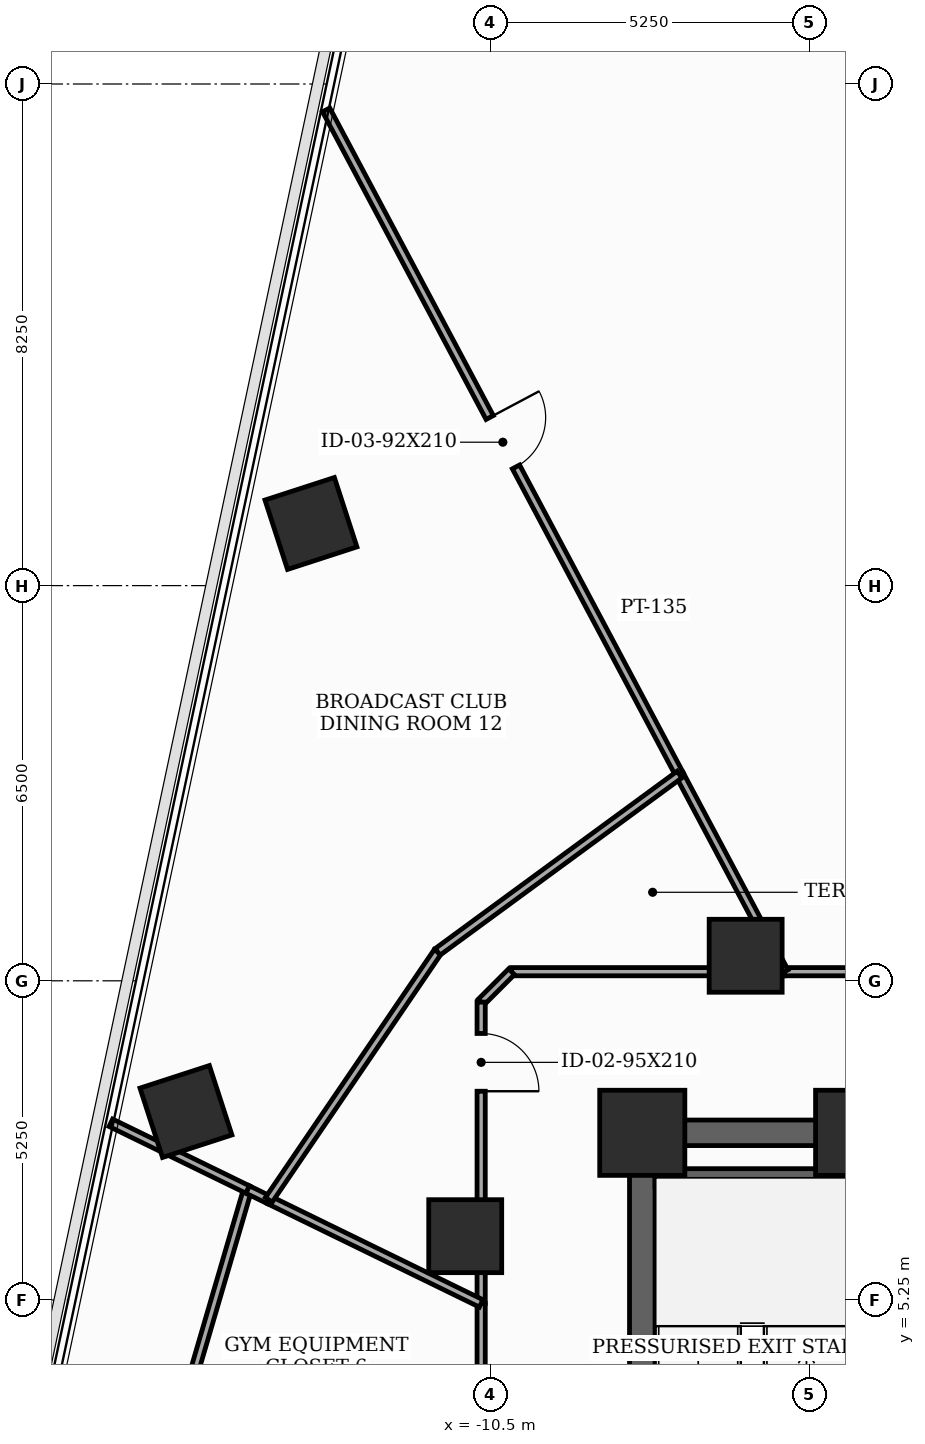
"""IFC4 building model, lengths in metres.
Left out: names, types, materials, properties, quantities, classifications, styles, units other than length and angle.
Written with IfcOpenShell. Run it as: python <this file> out.ifc"""

import sys

from ifc_helpers import new_model, si_unit, direction, frame, frame_2d, origin, origin_2d, place, context, subcontext, project, spatial, rectangle, extrude, element, fill, save


model = new_model("IFC4")
c1 = context("Model", 3, precision=1e-05, world=origin(), true_north=direction((0.0, 1.0)))
c2 = subcontext(c1, "Body", "Model", "MODEL_VIEW")
j1 = project(units=[si_unit("LENGTHUNIT", "METRE"), si_unit("PLANEANGLEUNIT", "RADIAN")], contexts=[c1])
p1 = place(None, origin())
s1 = spatial("IfcSite", under=j1, at=p1, CompositionType="ELEMENT")
p2 = place(p1, origin())
s2 = spatial("IfcBuilding", under=s1, at=p2, CompositionType="ELEMENT")
p3 = place(p2, frame((0.0, 0.0, 108.8)))
s3 = spatial("IfcBuildingStorey", under=s2, at=p3, CompositionType="ELEMENT", Elevation=108.8)
for number, where, z_axis, x_axis in (
    (1, (-4.45, 8.0, 0.0), (0.0, 0.0, 1.0), (1.0, 0.0, 0.0)),
    (2, (-8.0, 8.0, 0.0), (0.0, 0.0, 1.0), (1.0, 0.0, 0.0)),
):
    element("IfcColumn", number, at=place(p3, frame(where, z_axis=z_axis, x_axis=x_axis)), inside=s3, PredefinedType="COLUMN", context=c2, shape_type="SweptSolid", body=[
        extrude(rectangle(XDim=1.4, YDim=1.4, at=origin_2d()), origin(), (0.0, 0.0, 1.0), 3.7),
    ])
for number, where, z_axis, x_axis in (
    (3, (-6.3, 10.912, 0.0), (0.0, 0.0, 1.0), (1.0, 0.0, 0.0)),
    (4, (-10.912, 6.3, 0.0), (0.0, 0.0, 1.0), (1.0, 0.0, 0.0)),
    (5, (-13.449, 18.022, 0.0), (0.0, 0.0, 1.0), (0.951, 0.309, 0.0)),
    (6, (-15.505, 8.35, 0.0), (0.0, 0.0, 1.0), (0.951, 0.309, 0.0)),
):
    element("IfcColumn", number, at=place(p3, frame(where, z_axis=z_axis, x_axis=x_axis)), inside=s3, PredefinedType="COLUMN", context=c2, shape_type="SweptSolid", body=[
        extrude(rectangle(XDim=1.2, YDim=1.2, at=origin_2d()), origin(), (0.0, 0.0, 1.0), 3.7),
    ])
p4 = place(p3, frame((-8.0, -8.0, 0.0), z_axis=(0.0, 0.0, 1.0), x_axis=(0.0, 1.0, 0.0)))
e7 = element("IfcWall", 7, at=p4, inside=s3, PredefinedType="SHEAR", context=c2, shape_type="SweptSolid", body=[
    extrude(rectangle(XDim=16.0, YDim=0.42, at=frame_2d((8.0, 0.0))), origin(), (0.0, 0.0, 1.0), 3.5),
])
p5 = place(p4, frame((0.922, 0.0, 0.0)))
e8 = element("IfcOpeningElement", 8, at=p5, cuts=e7, PredefinedType="OPENING", context=c2, shape_type="SweptSolid", body=[
    extrude(rectangle(XDim=0.85, YDim=2.02, at=frame_2d((0.425, 1.01))), frame((0.0, 0.22, 0.0), z_axis=(0.0, -1.0, 0.0), x_axis=(1.0, 0.0, 0.0)), (0.0, 0.0, 1.0), 0.44),
])
p6 = place(p4, frame((5.35, 0.0, 0.0)))
e9 = element("IfcOpeningElement", 9, at=p6, cuts=e7, PredefinedType="OPENING", context=c2, shape_type="SweptSolid", body=[
    extrude(rectangle(XDim=1.05, YDim=2.15, at=frame_2d((0.525, 1.075))), frame((0.0, 0.22, 0.0), z_axis=(0.0, -1.0, 0.0), x_axis=(1.0, 0.0, 0.0)), (0.0, 0.0, 1.0), 0.44),
])
p7 = place(p3, frame((-8.0, 8.0, 0.0), z_axis=(0.0, 0.0, 1.0), x_axis=(1.0, 0.0, 0.0)))
e10 = element("IfcWall", 10, at=p7, inside=s3, PredefinedType="SHEAR", context=c2, shape_type="SweptSolid", body=[
    extrude(rectangle(XDim=16.0, YDim=0.42, at=frame_2d((8.0, 0.0))), origin(), (0.0, 0.0, 1.0), 3.5),
])
p8 = place(p7, frame((7.1, 0.0, 0.0)))
e11 = element("IfcOpeningElement", 11, at=p8, cuts=e10, PredefinedType="OPENING", context=c2, shape_type="SweptSolid", body=[
    extrude(rectangle(XDim=1.8, YDim=2.15, at=frame_2d((0.9, 1.075))), frame((0.0, 0.22, 0.0), z_axis=(0.0, -1.0, 0.0), x_axis=(1.0, 0.0, 0.0)), (0.0, 0.0, 1.0), 0.44),
])
p9 = place(p3, frame((-7.79, 7.26, 0.0), z_axis=(0.0, 0.0, 1.0), x_axis=(1.0, 0.0, 0.0)))
e12 = element("IfcWall", 12, at=p9, inside=s3, PredefinedType="SHEAR", context=c2, shape_type="SweptSolid", body=[
    extrude(rectangle(XDim=3.34, YDim=0.3, at=frame_2d((1.67, 0.0))), origin(), (0.0, 0.0, 1.0), 3.5),
])
p10 = place(p3, frame((-10.65, 5.194, 0.0), z_axis=(0.0, 0.0, 1.0), x_axis=(0.0, -1.0, 0.0)))
e13 = element("IfcWall", 13, at=p10, inside=s3, PredefinedType="PARTITIONING", context=c2, shape_type="SweptSolid", body=[
    extrude(rectangle(XDim=2.744, YDim=0.135, at=frame_2d((1.372, 0.0))), origin(), (0.0, 0.0, 1.0), 3.5),
])
p11 = place(p10, frame((1.226, 0.0, 0.0)))
e14 = element("IfcOpeningElement", 14, at=p11, cuts=e13, PredefinedType="OPENING", context=c2, shape_type="SweptSolid", body=[
    extrude(rectangle(XDim=0.95, YDim=2.1, at=frame_2d((0.475, 1.05))), frame((0.0, 0.077, 0.0), z_axis=(0.0, -1.0, 0.0), x_axis=(1.0, 0.0, 0.0)), (0.0, 0.0, 1.0), 0.155),
])
p12 = place(p3, frame((4.742, 10.65, 0.0), z_axis=(0.0, 0.0, 1.0), x_axis=(-1.0, 0.0, 0.0)))
e15 = element("IfcWall", 15, at=p12, inside=s3, PredefinedType="PARTITIONING", context=c2, shape_type="SweptSolid", body=[
    extrude(rectangle(XDim=10.405, YDim=0.135, at=frame_2d((5.203, 0.0))), origin(), (0.0, 0.0, 1.0), 2.785),
])
p13 = place(p12, frame((5.976, 0.0, 0.0)))
e16 = element("IfcOpeningElement", 16, at=p13, cuts=e15, PredefinedType="OPENING", context=c2, shape_type="SweptSolid", body=[
    extrude(rectangle(XDim=0.95, YDim=2.1, at=frame_2d((0.475, 1.05))), frame((0.0, 0.077, 0.0), z_axis=(0.0, -1.0, 0.0), x_axis=(1.0, 0.0, 0.0)), (0.0, 0.0, 1.0), 0.155),
])
p14 = place(p3, frame((-5.663, 10.65, 0.0), z_axis=(0.0, 0.0, 1.0), x_axis=(-1.0, 0.0, 0.0)))
e17 = element("IfcWall", 17, at=p14, inside=s3, PredefinedType="PARTITIONING", context=c2, shape_type="SweptSolid", body=[
    extrude(rectangle(XDim=4.487, YDim=0.135, at=frame_2d((2.243, 0.0))), origin(), (0.0, 0.0, 1.0), 2.785),
])
p15 = place(p3, frame((-10.15, 10.65, 0.0), z_axis=(0.0, 0.0, 1.0), x_axis=(-0.707106781187, -0.707106781187, 0.0)))
e18 = element("IfcWall", 18, at=p15, inside=s3, PredefinedType="PARTITIONING", context=c2, shape_type="SweptSolid", body=[
    extrude(rectangle(XDim=0.707, YDim=0.135, at=frame_2d((0.354, 0.0))), origin(), (0.0, 0.0, 1.0), 3.5),
])
p16 = place(p3, frame((-10.65, 10.15, 0.0), z_axis=(0.0, 0.0, 1.0), x_axis=(0.0, -1.0, 0.0)))
e19 = element("IfcWall", 19, at=p16, inside=s3, PredefinedType="PARTITIONING", context=c2, shape_type="SweptSolid", body=[
    extrude(rectangle(XDim=4.956, YDim=0.135, at=frame_2d((2.478, 0.0))), origin(), (0.0, 0.0, 1.0), 2.785),
])
p17 = place(p16, frame((0.516, 0.0, 0.0)))
e20 = element("IfcOpeningElement", 20, at=p17, cuts=e19, PredefinedType="OPENING", context=c2, shape_type="SweptSolid", body=[
    extrude(rectangle(XDim=0.95, YDim=2.1, at=frame_2d((0.475, 1.05))), frame((0.0, 0.077, 0.0), z_axis=(0.0, -1.0, 0.0), x_axis=(1.0, 0.0, 0.0)), (0.0, 0.0, 1.0), 0.155),
])
p18 = place(p3, frame((-14.491, 7.068, 0.0), z_axis=(0.0, 0.0, 1.0), x_axis=(-0.28111457881, -0.95967421221, 0.0)))
e21 = element("IfcWall", 21, at=p18, inside=s3, PredefinedType="PARTITIONING", context=c2, shape_type="SweptSolid", body=[
    extrude(rectangle(XDim=5.845, YDim=0.135, at=frame_2d((2.922, 0.0))), origin(), (0.0, 0.0, 1.0), 3.49),
])
p19 = place(p3, frame((-14.142, 6.898, 0.0), z_axis=(0.0, 0.0, 1.0), x_axis=(-0.898786579289, 0.438386456098, 0.0)))
e22 = element("IfcWall", 22, at=p19, inside=s3, PredefinedType="PARTITIONING", context=c2, shape_type="SweptSolid", body=[
    extrude(rectangle(XDim=0.388, YDim=0.135, at=frame_2d((0.194, 0.0))), origin(), (0.0, 0.0, 1.0), 3.5),
])
p20 = place(p3, frame((-10.65, 5.194, 0.0), z_axis=(0.0, 0.0, 1.0), x_axis=(-0.898732815367, 0.438496666558, 0.0)))
e23 = element("IfcWall", 23, at=p20, inside=s3, PredefinedType="PARTITIONING", context=c2, shape_type="SweptSolid", body=[
    extrude(rectangle(XDim=3.886, YDim=0.135, at=frame_2d((1.943, 0.0))), origin(), (0.0, 0.0, 1.0), 2.785),
])
p21 = place(p3, frame((-14.491, 7.068, 0.0), z_axis=(0.0, 0.0, 1.0), x_axis=(-0.898774071038, 0.438412099777, 0.0)))
e24 = element("IfcWall", 24, at=p21, inside=s3, PredefinedType="PARTITIONING", context=c2, shape_type="SweptSolid", body=[
    extrude(rectangle(XDim=2.503, YDim=0.135, at=frame_2d((1.251, 0.0))), origin(), (0.0, 0.0, 1.0), 2.925),
])
p22 = place(p3, frame((-13.199, 24.824, 0.0), z_axis=(0.0, 0.0, 1.0), x_axis=(0.46947528178, -0.882945615425, 0.0)))
e25 = element("IfcWall", 25, at=p22, inside=s3, PredefinedType="PARTITIONING", context=c2, shape_type="SweptSolid", body=[
    extrude(rectangle(XDim=12.38, YDim=0.135, at=frame_2d((6.19, 0.0))), origin(), (0.0, 0.0, 1.0), 2.935),
])
p23 = place(p22, frame((5.73, 0.0, 0.0)))
e26 = element("IfcOpeningElement", 26, at=p23, cuts=e25, PredefinedType="OPENING", context=c2, shape_type="SweptSolid", body=[
    extrude(rectangle(XDim=0.92, YDim=2.1, at=frame_2d((0.46, 1.05))), frame((0.0, 0.077, 0.0), z_axis=(0.0, -1.0, 0.0), x_axis=(1.0, 0.0, 0.0)), (0.0, 0.0, 1.0), 0.155),
])
p24 = place(p3, frame((-7.387, 13.893, 0.0), z_axis=(0.0, 0.0, 1.0), x_axis=(0.469356096826, -0.883008977515, 0.0)))
e27 = element("IfcWall", 27, at=p24, inside=s3, PredefinedType="PARTITIONING", context=c2, shape_type="SweptSolid", body=[
    extrude(rectangle(XDim=3.673, YDim=0.135, at=frame_2d((1.836, 0.0))), origin(), (0.0, 0.0, 1.0), 2.785),
])
p25 = place(p3, frame((-14.142, 6.898, 0.0), z_axis=(0.0, 0.0, 1.0), x_axis=(0.562725506953, 0.826643819202, 0.0)))
e28 = element("IfcWall", 28, at=p25, inside=s3, PredefinedType="PARTITIONING", context=c2, shape_type="SweptSolid", body=[
    extrude(rectangle(XDim=4.933, YDim=0.135, at=frame_2d((2.467, 0.0))), origin(), (0.0, 0.0, 1.0), 2.785),
])
p26 = place(p3, frame((-11.366, 10.976, 0.0), z_axis=(0.0, 0.0, 1.0), x_axis=(0.806496231999, 0.591239230576, 0.0)))
e29 = element("IfcWall", 29, at=p26, inside=s3, PredefinedType="PARTITIONING", context=c2, shape_type="SweptSolid", body=[
    extrude(rectangle(XDim=4.934, YDim=0.135, at=frame_2d((2.467, 0.0))), origin(), (0.0, 0.0, 1.0), 2.785),
])
p27 = place(p17, origin())
e30 = element("IfcDoor", 30, at=p27, inside=s3, OperationType="SINGLE_SWING_RIGHT", PredefinedType="DOOR", context=c2, shape_type="SweptSolid", body=[
    extrude(rectangle(XDim=0.95, YDim=2.1, at=frame_2d((0.475, 1.05))), frame((0.0, 0.025, 0.0), z_axis=(0.0, -1.0, 0.0), x_axis=(1.0, 0.0, 0.0)), (0.0, 0.0, 1.0), 0.05),
])
fill(e20, e30)
p28 = place(p23, origin())
e31 = element("IfcDoor", 31, at=p28, inside=s3, OperationType="SINGLE_SWING_LEFT", PredefinedType="DOOR", context=c2, shape_type="SweptSolid", body=[
    extrude(rectangle(XDim=0.92, YDim=2.1, at=frame_2d((0.46, 1.05))), frame((0.0, 0.025, 0.0), z_axis=(0.0, -1.0, 0.0), x_axis=(1.0, 0.0, 0.0)), (0.0, 0.0, 1.0), 0.05),
])
fill(e26, e31)
save(model, sys.argv[1])
